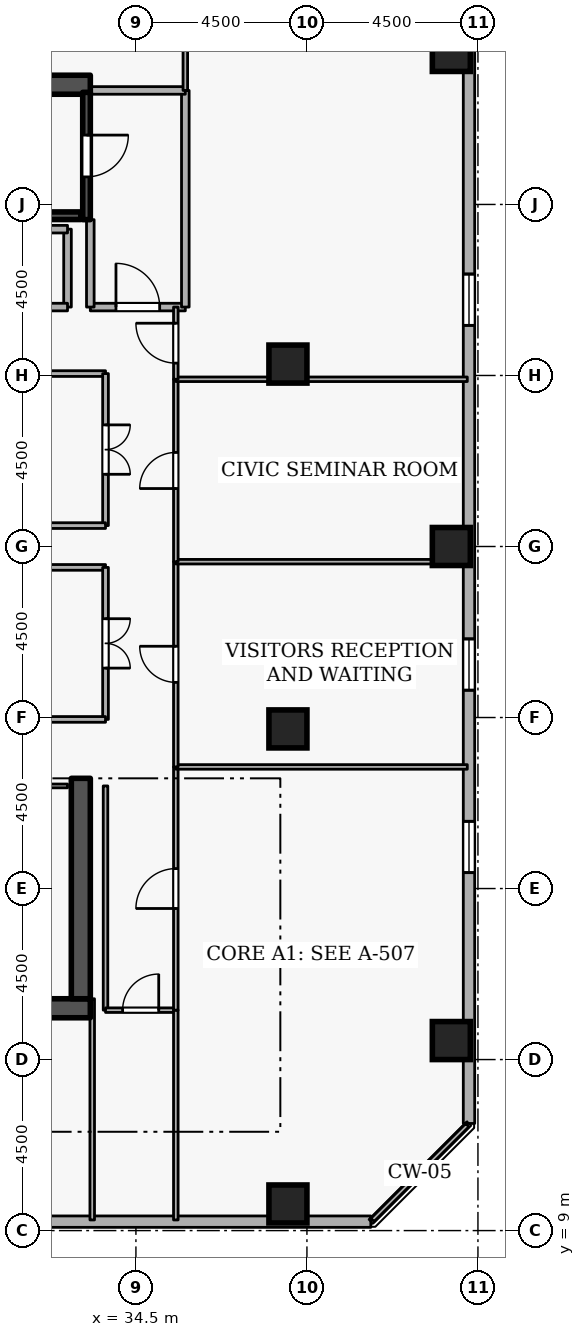
"""IFC4 building model, lengths in metres.
Left out: names, types, materials, properties, quantities, classifications, styles, units other than length and angle.
Written with IfcOpenShell. Run it as: python <this file> out.ifc"""

import sys

from ifc_helpers import new_model, si_unit, direction, frame, frame_2d, origin, origin_2d, place, context, subcontext, project, spatial, rectangle, extrude, element, fill, save


model = new_model("IFC4")
c1 = context("Model", 3, precision=1e-05, world=origin(), true_north=direction((0.0, 1.0)))
c2 = subcontext(c1, "Body", "Model", "MODEL_VIEW")
j1 = project(units=[si_unit("LENGTHUNIT", "METRE"), si_unit("PLANEANGLEUNIT", "RADIAN")], contexts=[c1])
p1 = place(None, origin())
s1 = spatial("IfcSite", under=j1, at=p1, CompositionType="ELEMENT")
p2 = place(p1, origin())
s2 = spatial("IfcBuilding", under=s1, at=p2, CompositionType="ELEMENT")
p3 = place(p2, frame((0.0, 0.0, 225.9)))
s3 = spatial("IfcBuildingStorey", under=s2, at=p3, CompositionType="ELEMENT", Elevation=225.9)
p4 = place(p3, frame((17.7, 14.85, 0.0), z_axis=(0.0, 0.0, 1.0), x_axis=(1.0, 0.0, 0.0)))
e1 = element("IfcWall", 1, at=p4, inside=s3, PredefinedType="SHEAR", context=c2, shape_type="SweptSolid", body=[
    extrude(rectangle(XDim=15.6, YDim=0.5, at=frame_2d((7.8, 0.0))), origin(), (0.0, 0.0, 1.0), 3.6),
])
p5 = place(p3, frame((33.05, 15.1, 0.0), z_axis=(0.0, 0.0, 1.0), x_axis=(0.0, 1.0, 0.0)))
e2 = element("IfcWall", 2, at=p5, inside=s3, PredefinedType="SHEAR", context=c2, shape_type="SweptSolid", body=[
    extrude(rectangle(XDim=5.8, YDim=0.5, at=frame_2d((2.9, 0.0))), origin(), (0.0, 0.0, 1.0), 3.6),
])
p6 = place(p3, frame((17.7, 39.15, 0.0), z_axis=(0.0, 0.0, 1.0), x_axis=(1.0, 0.0, 0.0)))
e3 = element("IfcWall", 3, at=p6, inside=s3, PredefinedType="SHEAR", context=c2, shape_type="SweptSolid", body=[
    extrude(rectangle(XDim=15.6, YDim=0.5, at=frame_2d((7.8, 0.0))), origin(), (0.0, 0.0, 1.0), 3.6),
])
for number, where, z_axis, x_axis in (
    (4, (38.5, 9.7, 0.0), (0.0, 0.0, 1.0), (1.0, 0.0, 0.0)),
    (5, (42.8, 14.0, 0.0), (0.0, 0.0, 1.0), (1.0, 0.0, 0.0)),
    (6, (42.8, 27.0, 0.0), (0.0, 0.0, 1.0), (1.0, 0.0, 0.0)),
    (7, (42.8, 40.0, 0.0), (0.0, 0.0, 1.0), (1.0, 0.0, 0.0)),
    (8, (38.5, 22.2, 0.0), (0.0, 0.0, 1.0), (1.0, 0.0, 0.0)),
    (9, (38.5, 31.8, 0.0), (0.0, 0.0, 1.0), (1.0, 0.0, 0.0)),
):
    element("IfcColumn", number, at=place(p3, frame(where, z_axis=z_axis, x_axis=x_axis)), inside=s3, PredefinedType="COLUMN", context=c2, shape_type="SweptSolid", body=[
        extrude(rectangle(XDim=1.0, YDim=1.0, at=origin_2d()), origin(), (0.0, 0.0, 1.0), 3.6),
    ])
p7 = place(p3, frame((4.319, 9.235, 0.0), z_axis=(0.0, 0.0, 1.0), x_axis=(1.0, 0.0, 0.0)))
e10 = element("IfcWall", 10, at=p7, inside=s3, PredefinedType="STANDARD", context=c2, shape_type="SweptSolid", body=[
    extrude(rectangle(XDim=36.363, YDim=0.3, at=frame_2d((18.181, 0.0))), origin(), (0.0, 0.0, 1.0), 2.22),
])
p8 = place(p7, frame((1.8, 0.0, 0.72)))
e11 = element("IfcOpeningElement", 11, at=p8, cuts=e10, PredefinedType="OPENING", context=c2, shape_type="SweptSolid", body=[
    extrude(rectangle(XDim=1.35, YDim=1.05, at=frame_2d((0.675, 0.525))), frame((0.0, 0.16, 0.0), z_axis=(0.0, -1.0, 0.0), x_axis=(1.0, 0.0, 0.0)), (0.0, 0.0, 1.0), 0.32),
])
p9 = place(p3, frame((43.265, 11.819, 0.0), z_axis=(0.0, 0.0, 1.0), x_axis=(0.0, 1.0, 0.0)))
e12 = element("IfcWall", 12, at=p9, inside=s3, PredefinedType="STANDARD", context=c2, shape_type="SweptSolid", body=[
    extrude(rectangle(XDim=36.363, YDim=0.3, at=frame_2d((18.181, 0.0))), origin(), (0.0, 0.0, 1.0), 2.22),
])
p10 = place(p9, frame((6.6, 0.0, 0.72)))
e13 = element("IfcOpeningElement", 13, at=p10, cuts=e12, PredefinedType="OPENING", context=c2, shape_type="SweptSolid", body=[
    extrude(rectangle(XDim=1.35, YDim=1.05, at=frame_2d((0.675, 0.525))), frame((0.0, 0.16, 0.0), z_axis=(0.0, -1.0, 0.0), x_axis=(1.0, 0.0, 0.0)), (0.0, 0.0, 1.0), 0.32),
])
p11 = place(p9, frame((11.4, 0.0, 0.72)))
e14 = element("IfcOpeningElement", 14, at=p11, cuts=e12, PredefinedType="OPENING", context=c2, shape_type="SweptSolid", body=[
    extrude(rectangle(XDim=1.35, YDim=1.05, at=frame_2d((0.675, 0.525))), frame((0.0, 0.16, 0.0), z_axis=(0.0, -1.0, 0.0), x_axis=(1.0, 0.0, 0.0)), (0.0, 0.0, 1.0), 0.32),
])
p12 = place(p9, frame((21.0, 0.0, 0.72)))
e15 = element("IfcOpeningElement", 15, at=p12, cuts=e12, PredefinedType="OPENING", context=c2, shape_type="SweptSolid", body=[
    extrude(rectangle(XDim=1.35, YDim=1.05, at=frame_2d((0.675, 0.525))), frame((0.0, 0.16, 0.0), z_axis=(0.0, -1.0, 0.0), x_axis=(1.0, 0.0, 0.0)), (0.0, 0.0, 1.0), 0.32),
])
p13 = place(p9, frame((30.6, 0.0, 0.72)))
e16 = element("IfcOpeningElement", 16, at=p13, cuts=e12, PredefinedType="OPENING", context=c2, shape_type="SweptSolid", body=[
    extrude(rectangle(XDim=1.35, YDim=1.05, at=frame_2d((0.675, 0.525))), frame((0.0, 0.16, 0.0), z_axis=(0.0, -1.0, 0.0), x_axis=(1.0, 0.0, 0.0)), (0.0, 0.0, 1.0), 0.32),
])
p14 = place(p3, frame((33.2, 38.95, 0.0), z_axis=(0.0, 0.0, 1.0), x_axis=(0.0, -1.0, 0.0)))
e17 = element("IfcWall", 17, at=p14, inside=s3, PredefinedType="SHEAR", context=c2, shape_type="SweptSolid", body=[
    extrude(rectangle(XDim=3.35, YDim=0.2, at=frame_2d((1.675, 0.0))), origin(), (0.0, 0.0, 1.0), 3.6),
])
p15 = place(p14, frame((1.125, 0.0, 0.0)))
e18 = element("IfcOpeningElement", 18, at=p15, cuts=e17, PredefinedType="OPENING", context=c2, shape_type="SweptSolid", body=[
    extrude(rectangle(XDim=1.1, YDim=2.1, at=frame_2d((0.55, 1.05))), frame((0.0, 0.11, 0.0), z_axis=(0.0, -1.0, 0.0), x_axis=(1.0, 0.0, 0.0)), (0.0, 0.0, 1.0), 0.22),
])
p16 = place(p3, frame((25.95, 35.703, 0.0), z_axis=(0.0, 0.0, 1.0), x_axis=(1.0, 0.0, 0.0)))
e19 = element("IfcWall", 19, at=p16, inside=s3, PredefinedType="SHEAR", context=c2, shape_type="SweptSolid", body=[
    extrude(rectangle(XDim=7.1, YDim=0.2, at=frame_2d((3.55, 0.0))), origin(), (0.0, 0.0, 1.0), 3.6),
])
p17 = place(p3, frame((33.3, 33.3, 0.0), z_axis=(0.0, 0.0, 1.0), x_axis=(1.0, 0.0, 0.0)))
e20 = element("IfcWall", 20, at=p17, inside=s3, PredefinedType="STANDARD", context=c2, shape_type="SweptSolid", body=[
    extrude(rectangle(XDim=2.5, YDim=0.2, at=frame_2d((1.25, 0.0))), origin(), (0.0, 0.0, 1.0), 3.3),
])
p18 = place(p17, frame((0.675, 0.0, 0.0)))
e21 = element("IfcOpeningElement", 21, at=p18, cuts=e20, PredefinedType="OPENING", context=c2, shape_type="SweptSolid", body=[
    extrude(rectangle(XDim=1.15, YDim=2.1, at=frame_2d((0.575, 1.05))), frame((0.0, 0.11, 0.0), z_axis=(0.0, -1.0, 0.0), x_axis=(1.0, 0.0, 0.0)), (0.0, 0.0, 1.0), 0.22),
])
p19 = place(p3, frame((35.8, 33.3, 0.0), z_axis=(0.0, 0.0, 1.0), x_axis=(0.0, 1.0, 0.0)))
e22 = element("IfcWall", 22, at=p19, inside=s3, PredefinedType="STANDARD", context=c2, shape_type="SweptSolid", body=[
    extrude(rectangle(XDim=5.7, YDim=0.2, at=frame_2d((2.85, 0.0))), origin(), (0.0, 0.0, 1.0), 3.3),
])
p20 = place(p3, frame((35.8, 39.0, 0.0), z_axis=(0.0, 0.0, 1.0), x_axis=(-1.0, 0.0, 0.0)))
e23 = element("IfcWall", 23, at=p20, inside=s3, PredefinedType="STANDARD", context=c2, shape_type="SweptSolid", body=[
    extrude(rectangle(XDim=2.5, YDim=0.2, at=frame_2d((1.25, 0.0))), origin(), (0.0, 0.0, 1.0), 3.3),
])
p21 = place(p3, frame((33.3, 35.6, 0.0), z_axis=(0.0, 0.0, 1.0), x_axis=(0.0, -1.0, 0.0)))
e24 = element("IfcWall", 24, at=p21, inside=s3, PredefinedType="STANDARD", context=c2, shape_type="SweptSolid", body=[
    extrude(rectangle(XDim=2.3, YDim=0.2, at=frame_2d((1.15, 0.0))), origin(), (0.0, 0.0, 1.0), 2.505),
])
p22 = place(p3, frame((32.7, 35.35, 0.0), z_axis=(0.0, 0.0, 1.0), x_axis=(0.0, -1.0, 0.0)))
e25 = element("IfcWall", 25, at=p22, inside=s3, PredefinedType="STANDARD", context=c2, shape_type="SweptSolid", body=[
    extrude(rectangle(XDim=2.05, YDim=0.2, at=frame_2d((1.025, 0.0))), origin(), (0.0, 0.0, 1.0), 2.505),
])
p23 = place(p3, frame((32.7, 33.3, 0.0), z_axis=(0.0, 0.0, 1.0), x_axis=(-1.0, 0.0, 0.0)))
e26 = element("IfcWall", 26, at=p23, inside=s3, PredefinedType="STANDARD", context=c2, shape_type="SweptSolid", body=[
    extrude(rectangle(XDim=2.35, YDim=0.2, at=frame_2d((1.175, 0.0))), origin(), (0.0, 0.0, 1.0), 3.3),
])
p24 = place(p23, frame((0.6, 0.0, 0.0)))
e27 = element("IfcOpeningElement", 27, at=p24, cuts=e26, PredefinedType="OPENING", context=c2, shape_type="SweptSolid", body=[
    extrude(rectangle(XDim=1.15, YDim=2.1, at=frame_2d((0.575, 1.05))), frame((0.0, 0.11, 0.0), z_axis=(0.0, -1.0, 0.0), x_axis=(1.0, 0.0, 0.0)), (0.0, 0.0, 1.0), 0.22),
])
p25 = place(p3, frame((30.35, 35.35, 0.0), z_axis=(0.0, 0.0, 1.0), x_axis=(1.0, 0.0, 0.0)))
e28 = element("IfcWall", 28, at=p25, inside=s3, PredefinedType="STANDARD", context=c2, shape_type="SweptSolid", body=[
    extrude(rectangle(XDim=2.35, YDim=0.2, at=frame_2d((1.175, 0.0))), origin(), (0.0, 0.0, 1.0), 3.3),
])
p26 = place(p3, frame((30.55, 20.7, 0.0), z_axis=(0.0, 0.0, 1.0), x_axis=(1.0, 0.0, 0.0)))
e29 = element("IfcWall", 29, at=p26, inside=s3, PredefinedType="PARTITIONING", context=c2, shape_type="SweptSolid", body=[
    extrude(rectangle(XDim=2.15, YDim=0.1, at=frame_2d((1.075, 0.0))), origin(), (0.0, 0.0, 1.0), 3.3),
])
p27 = place(p26, frame((0.6, 0.0, 0.0)))
e30 = element("IfcOpeningElement", 30, at=p27, cuts=e29, PredefinedType="OPENING", context=c2, shape_type="SweptSolid", body=[
    extrude(rectangle(XDim=0.95, YDim=2.1, at=frame_2d((0.475, 1.05))), frame((0.0, 0.06, 0.0), z_axis=(0.0, -1.0, 0.0), x_axis=(1.0, 0.0, 0.0)), (0.0, 0.0, 1.0), 0.12),
])
p28 = place(p3, frame((33.7, 20.7, 0.0), z_axis=(0.0, 0.0, 1.0), x_axis=(0.0, -1.0, 0.0)))
e31 = element("IfcWall", 31, at=p28, inside=s3, PredefinedType="PARTITIONING", context=c2, shape_type="SweptSolid", body=[
    extrude(rectangle(XDim=5.9, YDim=0.12, at=frame_2d((2.95, 0.0))), origin(), (0.0, 0.0, 1.0), 3.3),
])
p29 = place(p3, frame((33.7, 14.8, 0.0), z_axis=(0.0, 0.0, 1.0), x_axis=(1.0, 0.0, 0.0)))
e32 = element("IfcWall", 32, at=p29, inside=s3, PredefinedType="PARTITIONING", context=c2, shape_type="SweptSolid", body=[
    extrude(rectangle(XDim=1.85, YDim=0.12, at=frame_2d((0.925, 0.0))), origin(), (0.0, 0.0, 1.0), 3.3),
])
p30 = place(p29, frame((0.45, 0.0, 0.0)))
e33 = element("IfcOpeningElement", 33, at=p30, cuts=e32, PredefinedType="OPENING", context=c2, shape_type="SweptSolid", body=[
    extrude(rectangle(XDim=0.95, YDim=2.1, at=frame_2d((0.475, 1.05))), frame((0.0, 0.07, 0.0), z_axis=(0.0, -1.0, 0.0), x_axis=(1.0, 0.0, 0.0)), (0.0, 0.0, 1.0), 0.14),
])
p31 = place(p3, frame((35.55, 14.8, 0.0), z_axis=(0.0, 0.0, 1.0), x_axis=(0.0, -1.0, 0.0)))
e34 = element("IfcWall", 34, at=p31, inside=s3, PredefinedType="PARTITIONING", context=c2, shape_type="SweptSolid", body=[
    extrude(rectangle(XDim=5.52, YDim=0.12, at=frame_2d((2.76, 0.0))), origin(), (0.0, 0.0, 1.0), 3.3),
])
p32 = place(p3, frame((33.35, 9.28, 0.0), z_axis=(0.0, 0.0, 1.0), x_axis=(0.0, 1.0, 0.0)))
e35 = element("IfcWall", 35, at=p32, inside=s3, PredefinedType="PARTITIONING", context=c2, shape_type="SweptSolid", body=[
    extrude(rectangle(XDim=5.82, YDim=0.12, at=frame_2d((2.91, 0.0))), origin(), (0.0, 0.0, 1.0), 2.505),
])
p33 = place(p3, frame((35.55, 14.8, 0.0), z_axis=(0.0, 0.0, 1.0), x_axis=(0.0, 1.0, 0.0)))
e36 = element("IfcWall", 36, at=p33, inside=s3, PredefinedType="PARTITIONING", context=c2, shape_type="SweptSolid", body=[
    extrude(rectangle(XDim=6.4, YDim=0.12, at=frame_2d((3.2, 0.0))), origin(), (0.0, 0.0, 1.0), 3.3),
])
p34 = place(p33, frame((2.675, 0.0, 0.0)))
e37 = element("IfcOpeningElement", 37, at=p34, cuts=e36, PredefinedType="OPENING", context=c2, shape_type="SweptSolid", body=[
    extrude(rectangle(XDim=1.05, YDim=2.1, at=frame_2d((0.525, 1.05))), frame((0.0, 0.07, 0.0), z_axis=(0.0, -1.0, 0.0), x_axis=(1.0, 0.0, 0.0)), (0.0, 0.0, 1.0), 0.14),
])
p35 = place(p3, frame((35.55, 21.2, 0.0), z_axis=(0.0, 0.0, 1.0), x_axis=(1.0, 0.0, 0.0)))
e38 = element("IfcWall", 38, at=p35, inside=s3, PredefinedType="PARTITIONING", context=c2, shape_type="SweptSolid", body=[
    extrude(rectangle(XDim=7.67, YDim=0.12, at=frame_2d((3.835, 0.0))), origin(), (0.0, 0.0, 1.0), 3.3),
])
p36 = place(p3, frame((43.22, 11.775, 0.0), z_axis=(0.0, 0.0, 1.0), x_axis=(-0.707106781187, -0.707106781187, 0.0)))
e39 = element("IfcWall", 39, at=p36, inside=s3, PredefinedType="PARTITIONING", context=c2, shape_type="SweptSolid", body=[
    extrude(rectangle(XDim=3.528, YDim=0.12, at=frame_2d((1.764, 0.0))), origin(), (0.0, 0.0, 1.0), 3.3),
])
p37 = place(p3, frame((35.55, 21.2, 0.0), z_axis=(0.0, 0.0, 1.0), x_axis=(0.0, 1.0, 0.0)))
e40 = element("IfcWall", 40, at=p37, inside=s3, PredefinedType="PARTITIONING", context=c2, shape_type="SweptSolid", body=[
    extrude(rectangle(XDim=5.4, YDim=0.12, at=frame_2d((2.7, 0.0))), origin(), (0.0, 0.0, 1.0), 3.3),
])
p38 = place(p37, frame((2.225, 0.0, 0.0)))
e41 = element("IfcOpeningElement", 41, at=p38, cuts=e40, PredefinedType="OPENING", context=c2, shape_type="SweptSolid", body=[
    extrude(rectangle(XDim=0.95, YDim=2.1, at=frame_2d((0.475, 1.05))), frame((0.0, 0.07, 0.0), z_axis=(0.0, -1.0, 0.0), x_axis=(1.0, 0.0, 0.0)), (0.0, 0.0, 1.0), 0.14),
])
p39 = place(p3, frame((35.55, 26.6, 0.0), z_axis=(0.0, 0.0, 1.0), x_axis=(1.0, 0.0, 0.0)))
e42 = element("IfcWall", 42, at=p39, inside=s3, PredefinedType="PARTITIONING", context=c2, shape_type="SweptSolid", body=[
    extrude(rectangle(XDim=7.67, YDim=0.12, at=frame_2d((3.835, 0.0))), origin(), (0.0, 0.0, 1.0), 3.3),
])
p40 = place(p3, frame((35.55, 26.6, 0.0), z_axis=(0.0, 0.0, 1.0), x_axis=(0.0, 1.0, 0.0)))
e43 = element("IfcWall", 43, at=p40, inside=s3, PredefinedType="PARTITIONING", context=c2, shape_type="SweptSolid", body=[
    extrude(rectangle(XDim=4.8, YDim=0.12, at=frame_2d((2.4, 0.0))), origin(), (0.0, 0.0, 1.0), 3.3),
])
p41 = place(p40, frame((1.925, 0.0, 0.0)))
e44 = element("IfcOpeningElement", 44, at=p41, cuts=e43, PredefinedType="OPENING", context=c2, shape_type="SweptSolid", body=[
    extrude(rectangle(XDim=0.95, YDim=2.1, at=frame_2d((0.475, 1.05))), frame((0.0, 0.07, 0.0), z_axis=(0.0, -1.0, 0.0), x_axis=(1.0, 0.0, 0.0)), (0.0, 0.0, 1.0), 0.14),
])
p42 = place(p3, frame((35.55, 31.4, 0.0), z_axis=(0.0, 0.0, 1.0), x_axis=(1.0, 0.0, 0.0)))
e45 = element("IfcWall", 45, at=p42, inside=s3, PredefinedType="PARTITIONING", context=c2, shape_type="SweptSolid", body=[
    extrude(rectangle(XDim=7.67, YDim=0.12, at=frame_2d((3.835, 0.0))), origin(), (0.0, 0.0, 1.0), 3.3),
])
p43 = place(p3, frame((35.8, 39.0, 0.0), z_axis=(0.0, 0.0, 1.0), x_axis=(0.0, 1.0, 0.0)))
e46 = element("IfcWall", 46, at=p43, inside=s3, PredefinedType="PARTITIONING", context=c2, shape_type="SweptSolid", body=[
    extrude(rectangle(XDim=11.72, YDim=0.12, at=frame_2d((5.86, 0.0))), origin(), (0.0, 0.0, 1.0), 3.3),
])
p44 = place(p3, frame((35.55, 31.4, 0.0), z_axis=(0.0, 0.0, 1.0), x_axis=(0.0, 1.0, 0.0)))
e47 = element("IfcWall", 47, at=p44, inside=s3, PredefinedType="PARTITIONING", context=c2, shape_type="SweptSolid", body=[
    extrude(rectangle(XDim=1.9, YDim=0.12, at=frame_2d((0.95, 0.0))), origin(), (0.0, 0.0, 1.0), 3.3),
])
p45 = place(p44, frame((0.425, 0.0, 0.0)))
e48 = element("IfcOpeningElement", 48, at=p45, cuts=e47, PredefinedType="OPENING", context=c2, shape_type="SweptSolid", body=[
    extrude(rectangle(XDim=1.05, YDim=2.1, at=frame_2d((0.525, 1.05))), frame((0.0, 0.07, 0.0), z_axis=(0.0, -1.0, 0.0), x_axis=(1.0, 0.0, 0.0)), (0.0, 0.0, 1.0), 0.14),
])
p46 = place(p3, frame((30.7, 26.45, 0.0), z_axis=(0.0, 0.0, 1.0), x_axis=(1.0, 0.0, 0.0)))
e49 = element("IfcWall", 49, at=p46, inside=s3, PredefinedType="PARTITIONING", context=c2, shape_type="SweptSolid", body=[
    extrude(rectangle(XDim=3.0, YDim=0.15, at=frame_2d((1.5, 0.0))), origin(), (0.0, 0.0, 1.0), 3.3),
])
p47 = place(p3, frame((33.7, 26.45, 0.0), z_axis=(0.0, 0.0, 1.0), x_axis=(0.0, -1.0, 0.0)))
e50 = element("IfcWall", 50, at=p47, inside=s3, PredefinedType="PARTITIONING", context=c2, shape_type="SweptSolid", body=[
    extrude(rectangle(XDim=4.0, YDim=0.15, at=frame_2d((2.0, 0.0))), origin(), (0.0, 0.0, 1.0), 3.3),
])
p48 = place(p47, frame((1.35, 0.0, 0.0)))
e51 = element("IfcOpeningElement", 51, at=p48, cuts=e50, PredefinedType="OPENING", context=c2, shape_type="SweptSolid", body=[
    extrude(rectangle(XDim=1.3, YDim=2.12, at=frame_2d((0.65, 1.06))), frame((0.0, 0.085, 0.0), z_axis=(0.0, -1.0, 0.0), x_axis=(1.0, 0.0, 0.0)), (0.0, 0.0, 1.0), 0.17),
])
for number, where, z_axis, x_axis in (
    (52, (33.7, 22.45, 0.0), (0.0, 0.0, 1.0), (-1.0, 0.0, 0.0)),
    (53, (30.7, 31.55, 0.0), (0.0, 0.0, 1.0), (1.0, 0.0, 0.0)),
):
    element("IfcWall", number, at=place(p3, frame(where, z_axis=z_axis, x_axis=x_axis)), inside=s3, PredefinedType="PARTITIONING", context=c2, shape_type="SweptSolid", body=[
        extrude(rectangle(XDim=3.0, YDim=0.15, at=frame_2d((1.5, 0.0))), origin(), (0.0, 0.0, 1.0), 3.3),
    ])
p49 = place(p3, frame((33.7, 31.55, 0.0), z_axis=(0.0, 0.0, 1.0), x_axis=(0.0, -1.0, 0.0)))
e54 = element("IfcWall", 54, at=p49, inside=s3, PredefinedType="PARTITIONING", context=c2, shape_type="SweptSolid", body=[
    extrude(rectangle(XDim=4.0, YDim=0.15, at=frame_2d((2.0, 0.0))), origin(), (0.0, 0.0, 1.0), 3.3),
])
p50 = place(p49, frame((1.35, 0.0, 0.0)))
e55 = element("IfcOpeningElement", 55, at=p50, cuts=e54, PredefinedType="OPENING", context=c2, shape_type="SweptSolid", body=[
    extrude(rectangle(XDim=1.3, YDim=2.12, at=frame_2d((0.65, 1.06))), frame((0.0, 0.085, 0.0), z_axis=(0.0, -1.0, 0.0), x_axis=(1.0, 0.0, 0.0)), (0.0, 0.0, 1.0), 0.17),
])
p51 = place(p3, frame((33.7, 27.55, 0.0), z_axis=(0.0, 0.0, 1.0), x_axis=(-1.0, 0.0, 0.0)))
e56 = element("IfcWall", 56, at=p51, inside=s3, PredefinedType="PARTITIONING", context=c2, shape_type="SweptSolid", body=[
    extrude(rectangle(XDim=3.0, YDim=0.15, at=frame_2d((1.5, 0.0))), origin(), (0.0, 0.0, 1.0), 3.3),
])
p52 = place(p10, origin())
e57 = element("IfcWindow", 57, at=p52, inside=s3, PartitioningType="SINGLE_PANEL", PredefinedType="WINDOW", context=c2, shape_type="SweptSolid", body=[
    extrude(rectangle(XDim=1.35, YDim=1.05, at=frame_2d((0.675, 0.525))), frame((0.0, 0.03, 0.0), z_axis=(0.0, -1.0, 0.0), x_axis=(1.0, 0.0, 0.0)), (0.0, 0.0, 1.0), 0.06),
])
fill(e13, e57)
p53 = place(p11, origin())
e58 = element("IfcWindow", 58, at=p53, inside=s3, PartitioningType="SINGLE_PANEL", PredefinedType="WINDOW", context=c2, shape_type="SweptSolid", body=[
    extrude(rectangle(XDim=1.35, YDim=1.05, at=frame_2d((0.675, 0.525))), frame((0.0, 0.03, 0.0), z_axis=(0.0, -1.0, 0.0), x_axis=(1.0, 0.0, 0.0)), (0.0, 0.0, 1.0), 0.06),
])
fill(e14, e58)
p54 = place(p12, origin())
e59 = element("IfcWindow", 59, at=p54, inside=s3, PartitioningType="SINGLE_PANEL", PredefinedType="WINDOW", context=c2, shape_type="SweptSolid", body=[
    extrude(rectangle(XDim=1.35, YDim=1.05, at=frame_2d((0.675, 0.525))), frame((0.0, 0.03, 0.0), z_axis=(0.0, -1.0, 0.0), x_axis=(1.0, 0.0, 0.0)), (0.0, 0.0, 1.0), 0.06),
])
fill(e15, e59)
p55 = place(p15, origin())
e60 = element("IfcDoor", 60, at=p55, inside=s3, OperationType="SINGLE_SWING_LEFT", PredefinedType="DOOR", context=c2, shape_type="SweptSolid", body=[
    extrude(rectangle(XDim=1.1, YDim=2.1, at=frame_2d((0.55, 1.05))), frame((0.0, 0.025, 0.0), z_axis=(0.0, -1.0, 0.0), x_axis=(1.0, 0.0, 0.0)), (0.0, 0.0, 1.0), 0.05),
])
fill(e18, e60)
p56 = place(p18, origin())
e61 = element("IfcDoor", 61, at=p56, inside=s3, OperationType="SINGLE_SWING_LEFT", PredefinedType="DOOR", context=c2, shape_type="SweptSolid", body=[
    extrude(rectangle(XDim=1.15, YDim=2.1, at=frame_2d((0.575, 1.05))), frame((0.0, 0.025, 0.0), z_axis=(0.0, -1.0, 0.0), x_axis=(1.0, 0.0, 0.0)), (0.0, 0.0, 1.0), 0.05),
])
fill(e21, e61)
p57 = place(p30, origin())
e62 = element("IfcDoor", 62, at=p57, inside=s3, OperationType="SINGLE_SWING_RIGHT", PredefinedType="DOOR", context=c2, shape_type="SweptSolid", body=[
    extrude(rectangle(XDim=0.95, YDim=2.1, at=frame_2d((0.475, 1.05))), frame((0.0, 0.025, 0.0), z_axis=(0.0, -1.0, 0.0), x_axis=(1.0, 0.0, 0.0)), (0.0, 0.0, 1.0), 0.05),
])
fill(e33, e62)
p58 = place(p34, origin())
e63 = element("IfcDoor", 63, at=p58, inside=s3, OperationType="SINGLE_SWING_LEFT", PredefinedType="DOOR", context=c2, shape_type="SweptSolid", body=[
    extrude(rectangle(XDim=1.05, YDim=2.1, at=frame_2d((0.525, 1.05))), frame((0.0, 0.025, 0.0), z_axis=(0.0, -1.0, 0.0), x_axis=(1.0, 0.0, 0.0)), (0.0, 0.0, 1.0), 0.05),
])
fill(e37, e63)
p59 = place(p38, origin())
e64 = element("IfcDoor", 64, at=p59, inside=s3, OperationType="SINGLE_SWING_RIGHT", PredefinedType="DOOR", context=c2, shape_type="SweptSolid", body=[
    extrude(rectangle(XDim=0.95, YDim=2.1, at=frame_2d((0.475, 1.05))), frame((0.0, 0.025, 0.0), z_axis=(0.0, -1.0, 0.0), x_axis=(1.0, 0.0, 0.0)), (0.0, 0.0, 1.0), 0.05),
])
fill(e41, e64)
p60 = place(p41, origin())
e65 = element("IfcDoor", 65, at=p60, inside=s3, OperationType="SINGLE_SWING_LEFT", PredefinedType="DOOR", context=c2, shape_type="SweptSolid", body=[
    extrude(rectangle(XDim=0.95, YDim=2.1, at=frame_2d((0.475, 1.05))), frame((0.0, 0.025, 0.0), z_axis=(0.0, -1.0, 0.0), x_axis=(1.0, 0.0, 0.0)), (0.0, 0.0, 1.0), 0.05),
])
fill(e44, e65)
p61 = place(p45, origin())
e66 = element("IfcDoor", 66, at=p61, inside=s3, OperationType="SINGLE_SWING_RIGHT", PredefinedType="DOOR", context=c2, shape_type="SweptSolid", body=[
    extrude(rectangle(XDim=1.05, YDim=2.1, at=frame_2d((0.525, 1.05))), frame((0.0, 0.025, 0.0), z_axis=(0.0, -1.0, 0.0), x_axis=(1.0, 0.0, 0.0)), (0.0, 0.0, 1.0), 0.05),
])
fill(e48, e66)
p62 = place(p48, origin())
e67 = element("IfcDoor", 67, at=p62, inside=s3, OperationType="DOUBLE_DOOR_SINGLE_SWING", PredefinedType="DOOR", context=c2, shape_type="SweptSolid", body=[
    extrude(rectangle(XDim=1.3, YDim=2.12, at=frame_2d((0.65, 1.06))), frame((0.0, 0.025, 0.0), z_axis=(0.0, -1.0, 0.0), x_axis=(1.0, 0.0, 0.0)), (0.0, 0.0, 1.0), 0.05),
])
fill(e51, e67)
p63 = place(p50, origin())
e68 = element("IfcDoor", 68, at=p63, inside=s3, OperationType="DOUBLE_DOOR_SINGLE_SWING", PredefinedType="DOOR", context=c2, shape_type="SweptSolid", body=[
    extrude(rectangle(XDim=1.3, YDim=2.12, at=frame_2d((0.65, 1.06))), frame((0.0, 0.025, 0.0), z_axis=(0.0, -1.0, 0.0), x_axis=(1.0, 0.0, 0.0)), (0.0, 0.0, 1.0), 0.05),
])
fill(e55, e68)
save(model, sys.argv[1])
